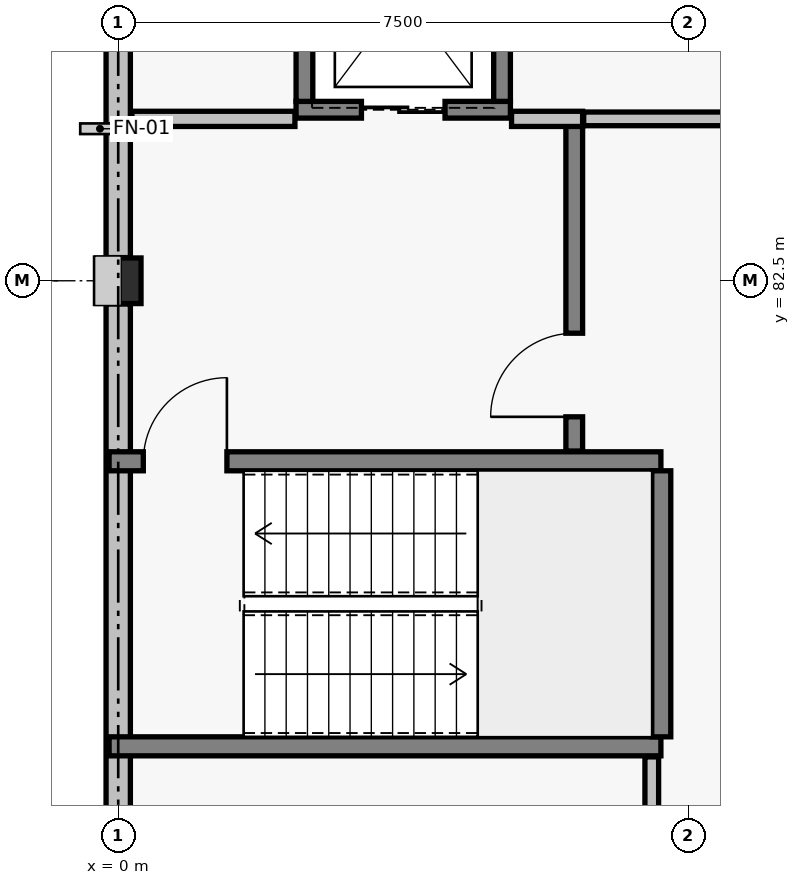
"""IFC4 building model, lengths in metres.
Left out: names, types, materials, properties, quantities, classifications, styles, units other than length and angle.
Written with IfcOpenShell. Run it as: python <this file> out.ifc"""

import sys

from ifc_helpers import new_model, si_unit, direction, frame, frame_2d, origin, origin_2d, place, context, subcontext, project, spatial, rectangle, extrude, element, fill, save


model = new_model("IFC4")
c1 = context("Model", 3, precision=1e-05, world=origin(), true_north=direction((0.0, 1.0)))
c2 = subcontext(c1, "Body", "Model", "MODEL_VIEW")
j1 = project(units=[si_unit("LENGTHUNIT", "METRE"), si_unit("PLANEANGLEUNIT", "RADIAN")], contexts=[c1])
p1 = place(None, origin())
s1 = spatial("IfcSite", under=j1, at=p1, CompositionType="ELEMENT")
p2 = place(p1, origin())
s2 = spatial("IfcBuilding", under=s1, at=p2, CompositionType="ELEMENT")
p3 = place(p2, frame((0.0, 0.0, 9.0)))
s3 = spatial("IfcBuildingStorey", under=s2, at=p3, CompositionType="ELEMENT", Elevation=9.0)
p4 = place(p3, frame((0.0, 82.5, 0.0), z_axis=(0.0, 0.0, 1.0), x_axis=(1.0, 0.0, 0.0)))
e1 = element("IfcColumn", 1, at=p4, inside=s3, PredefinedType="COLUMN", context=c2, shape_type="SweptSolid", body=[
    extrude(rectangle(XDim=0.6, YDim=0.6, at=origin_2d()), origin(), (0.0, 0.0, 1.0), 4.2),
])
for number, where, z_axis, x_axis in (
    (2, (0.0, 75.305, 0.0), (0.0, 0.0, 1.0), (0.0, 1.0, 0.0)),
    (3, (0.0, 82.805, 0.0), (0.0, 0.0, 1.0), (0.0, 1.0, 0.0)),
):
    element("IfcWall", number, at=place(p3, frame(where, z_axis=z_axis, x_axis=x_axis)), inside=s3, PredefinedType="SOLIDWALL", context=c2, shape_type="SweptSolid", body=[
        extrude(rectangle(XDim=6.89, YDim=0.32, at=frame_2d((3.445, 0.0))), origin(), (0.0, 0.0, 1.0), 2.87),
    ])
p5 = place(p3, frame((-0.12, 76.375, 0.0), z_axis=(0.0, 0.0, 1.0), x_axis=(1.0, 0.0, 0.0)))
e4 = element("IfcWall", 4, at=p5, inside=s3, PredefinedType="SOLIDWALL", context=c2, shape_type="SweptSolid", body=[
    extrude(rectangle(XDim=7.26, YDim=0.25, at=frame_2d((3.63, 0.0))), origin(), (0.0, 0.0, 1.0), 3.92),
])
p6 = place(p3, frame((-0.12, 80.125, 0.0), z_axis=(0.0, 0.0, 1.0), x_axis=(1.0, 0.0, 0.0)))
e5 = element("IfcWall", 5, at=p6, inside=s3, PredefinedType="SOLIDWALL", context=c2, shape_type="SweptSolid", body=[
    extrude(rectangle(XDim=7.26, YDim=0.25, at=frame_2d((3.63, 0.0))), origin(), (0.0, 0.0, 1.0), 3.92),
])
p7 = place(p6, frame((0.45, 0.0, 0.0)))
e6 = element("IfcOpeningElement", 6, at=p7, cuts=e5, PredefinedType="OPENING", context=c2, shape_type="SweptSolid", body=[
    extrude(rectangle(XDim=1.1, YDim=2.15, at=frame_2d((0.55, 1.075))), frame((0.0, 0.135, 0.0), z_axis=(0.0, -1.0, 0.0), x_axis=(1.0, 0.0, 0.0)), (0.0, 0.0, 1.0), 0.27),
])
p8 = place(p3, frame((7.145, 76.5, 0.0), z_axis=(0.0, 0.0, 1.0), x_axis=(0.0, 1.0, 0.0)))
e7 = element("IfcWall", 7, at=p8, inside=s3, PredefinedType="SOLIDWALL", context=c2, shape_type="SweptSolid", body=[
    extrude(rectangle(XDim=3.5, YDim=0.25, at=frame_2d((1.75, 0.0))), origin(), (0.0, 0.0, 1.0), 3.92),
])
p9 = place(p3, frame((2.34, 84.75, 0.0), z_axis=(0.0, 0.0, 1.0), x_axis=(1.0, 0.0, 0.0)))
e8 = element("IfcWall", 8, at=p9, inside=s3, PredefinedType="SOLIDWALL", context=c2, shape_type="SweptSolid", body=[
    extrude(rectangle(XDim=2.82, YDim=0.22, at=frame_2d((1.41, 0.0))), origin(), (0.0, 0.0, 1.0), 3.92),
])
p10 = place(p9, frame((0.86, 0.0, 0.0)))
e9 = element("IfcOpeningElement", 9, at=p10, cuts=e8, PredefinedType="OPENING", context=c2, shape_type="SweptSolid", body=[
    extrude(rectangle(XDim=1.1, YDim=2.15, at=frame_2d((0.55, 1.075))), frame((0.0, 0.12, 0.0), z_axis=(0.0, -1.0, 0.0), x_axis=(1.0, 0.0, 0.0)), (0.0, 0.0, 1.0), 0.24),
])
for number, where, z_axis, x_axis in (
    (10, (2.45, 84.86, 0.0), (0.0, 0.0, 1.0), (0.0, 1.0, 0.0)),
    (11, (5.05, 84.86, 0.0), (0.0, 0.0, 1.0), (0.0, 1.0, 0.0)),
):
    element("IfcWall", number, at=place(p3, frame(where, z_axis=z_axis, x_axis=x_axis)), inside=s3, PredefinedType="SOLIDWALL", context=c2, shape_type="SweptSolid", body=[
        extrude(rectangle(XDim=2.78, YDim=0.22, at=frame_2d((1.39, 0.0))), origin(), (0.0, 0.0, 1.0), 3.92),
    ])
p11 = place(p3, frame((6.0, 80.26, 0.0), z_axis=(0.0, 0.0, 1.0), x_axis=(0.0, 1.0, 0.0)))
e12 = element("IfcWall", 12, at=p11, inside=s3, PredefinedType="SOLIDWALL", context=c2, shape_type="SweptSolid", body=[
    extrude(rectangle(XDim=4.37, YDim=0.22, at=frame_2d((2.185, 0.0))), origin(), (0.0, 0.0, 1.0), 3.92),
])
p12 = place(p11, frame((0.45, 0.0, 0.0)))
e13 = element("IfcOpeningElement", 13, at=p12, cuts=e12, PredefinedType="OPENING", context=c2, shape_type="SweptSolid", body=[
    extrude(rectangle(XDim=1.1, YDim=2.15, at=frame_2d((0.55, 1.075))), frame((0.0, 0.12, 0.0), z_axis=(0.0, -1.0, 0.0), x_axis=(1.0, 0.0, 0.0)), (0.0, 0.0, 1.0), 0.24),
])
p13 = place(p3, frame((0.18, 84.63, 0.0), z_axis=(0.0, 0.0, 1.0), x_axis=(1.0, 0.0, 0.0)))
e14 = element("IfcWall", 14, at=p13, inside=s3, PredefinedType="PARTITIONING", context=c2, shape_type="SweptSolid", body=[
    extrude(rectangle(XDim=2.145, YDim=0.2, at=frame_2d((1.073, 0.0))), origin(), (0.0, 0.0, 1.0), 3.28),
])
p14 = place(p3, frame((5.175, 84.63, 0.0), z_axis=(0.0, 0.0, 1.0), x_axis=(1.0, 0.0, 0.0)))
e15 = element("IfcWall", 15, at=p14, inside=s3, PredefinedType="PARTITIONING", context=c2, shape_type="SweptSolid", body=[
    extrude(rectangle(XDim=0.935, YDim=0.2, at=frame_2d((0.468, 0.0))), origin(), (0.0, 0.0, 1.0), 3.33),
])
p15 = place(p3, frame((7.02, 75.0, 0.0), z_axis=(0.0, 0.0, 1.0), x_axis=(0.0, 1.0, 0.0)))
e16 = element("IfcWall", 16, at=p15, inside=s3, PredefinedType="PARTITIONING", context=c2, shape_type="SweptSolid", body=[
    extrude(rectangle(XDim=1.236, YDim=0.18, at=frame_2d((0.618, 0.0))), origin(), (0.0, 0.0, 1.0), 2.87),
])
p16 = place(p3, frame((6.124, 84.63, 0.0), z_axis=(0.0, 0.0, 1.0), x_axis=(1.0, 0.0, 0.0)))
e17 = element("IfcWall", 17, at=p16, inside=s3, PredefinedType="PARTITIONING", context=c2, shape_type="SweptSolid", body=[
    extrude(rectangle(XDim=3.556, YDim=0.18, at=frame_2d((1.778, 0.0))), origin(), (0.0, 0.0, 1.0), 3.27),
])
p17 = place(p7, origin())
e18 = element("IfcDoor", 18, at=p17, inside=s3, OperationType="SINGLE_SWING_RIGHT", PredefinedType="DOOR", context=c2, shape_type="SweptSolid", body=[
    extrude(rectangle(XDim=1.1, YDim=2.15, at=frame_2d((0.55, 1.075))), frame((0.0, 0.025, 0.0), z_axis=(0.0, -1.0, 0.0), x_axis=(1.0, 0.0, 0.0)), (0.0, 0.0, 1.0), 0.05),
])
fill(e6, e18)
p18 = place(p10, origin())
e19 = element("IfcDoor", 19, at=p18, inside=s3, OperationType="SLIDING_TO_LEFT", PredefinedType="DOOR", context=c2, shape_type="SweptSolid", body=[
    extrude(rectangle(XDim=1.1, YDim=2.15, at=frame_2d((0.55, 1.075))), frame((0.0, 0.025, 0.0), z_axis=(0.0, -1.0, 0.0), x_axis=(1.0, 0.0, 0.0)), (0.0, 0.0, 1.0), 0.05),
])
fill(e9, e19)
p19 = place(p12, origin())
e20 = element("IfcDoor", 20, at=p19, inside=s3, OperationType="SINGLE_SWING_LEFT", PredefinedType="DOOR", context=c2, shape_type="SweptSolid", body=[
    extrude(rectangle(XDim=1.1, YDim=2.15, at=frame_2d((0.55, 1.075))), frame((0.0, 0.025, 0.0), z_axis=(0.0, -1.0, 0.0), x_axis=(1.0, 0.0, 0.0)), (0.0, 0.0, 1.0), 0.05),
])
fill(e13, e20)
save(model, sys.argv[1])
